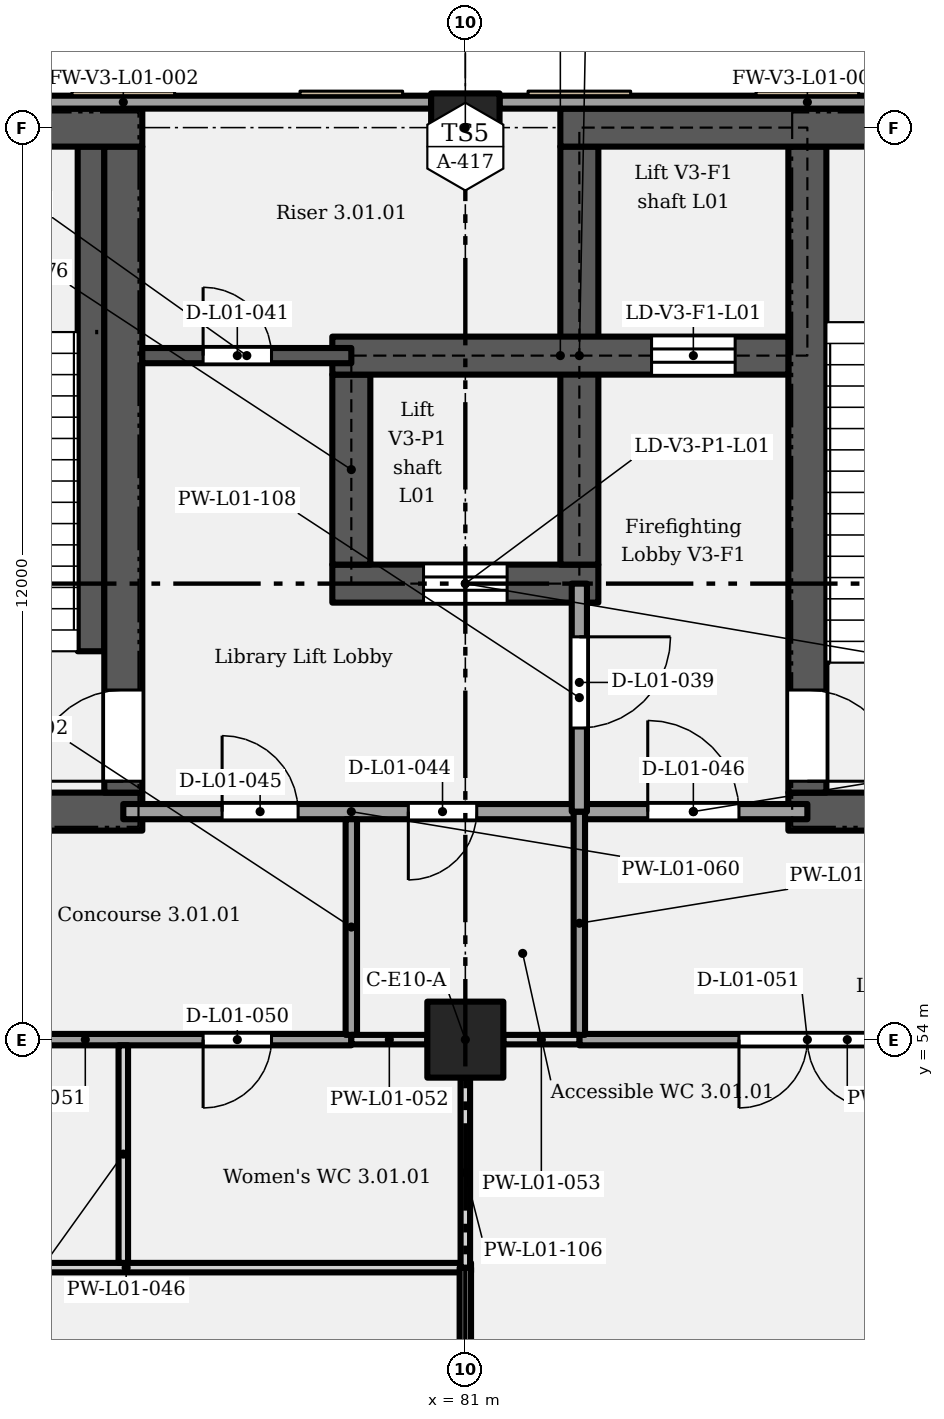
"""IFC4 building model, lengths in metres.
Left out: names, types, materials, properties, quantities, classifications, styles, units other than length and angle.
Written with IfcOpenShell. Run it as: python <this file> out.ifc"""

import sys

from ifc_helpers import new_model, si_unit, direction, frame, frame_2d, origin, origin_2d, place, context, subcontext, project, spatial, rectangle, extrude, element, fill, save


model = new_model("IFC4")
c1 = context("Model", 3, precision=1e-05, world=origin(), true_north=direction((0.0, 1.0)))
c2 = subcontext(c1, "Body", "Model", "MODEL_VIEW")
j1 = project(units=[si_unit("LENGTHUNIT", "METRE"), si_unit("PLANEANGLEUNIT", "RADIAN")], contexts=[c1])
p1 = place(None, origin())
s1 = spatial("IfcSite", under=j1, at=p1, CompositionType="ELEMENT")
p2 = place(p1, origin())
s2 = spatial("IfcBuilding", under=s1, at=p2, CompositionType="ELEMENT")
p3 = place(p2, frame((0.0, 0.0, 6.6)))
s3 = spatial("IfcBuildingStorey", under=s2, at=p3, CompositionType="ELEMENT", Elevation=6.6)
p4 = place(p3, frame((81.0, 54.0, 0.0), z_axis=(0.0, 0.0, 1.0), x_axis=(1.0, 0.0, 0.0)))
e1 = element("IfcColumn", 1, at=p4, inside=s3, PredefinedType="COLUMN", context=c2, shape_type="SweptSolid", body=[
    extrude(rectangle(XDim=1.0, YDim=1.0, at=origin_2d()), origin(), (0.0, 0.0, 1.0), 5.4),
])
p5 = place(p3, frame((81.0, 66.0, 0.0), z_axis=(0.0, 0.0, 1.0), x_axis=(1.0, 0.0, 0.0)))
e2 = element("IfcColumn", 2, at=p5, inside=s3, PredefinedType="COLUMN", context=c2, shape_type="SweptSolid", body=[
    extrude(rectangle(XDim=0.9, YDim=0.9, at=origin_2d()), origin(), (0.0, 0.0, 1.0), 5.4),
])
p6 = place(p3, frame((71.75, 57.0, 0.0), z_axis=(0.0, 0.0, 1.0), x_axis=(1.0, 0.0, 0.0)))
e3 = element("IfcWall", 3, at=p6, inside=s3, PredefinedType="SHEAR", context=c2, shape_type="SweptSolid", body=[
    extrude(rectangle(XDim=5.0, YDim=0.5, at=frame_2d((2.5, 0.0))), origin(), (0.0, 0.0, 1.0), 5.1),
])
p7 = place(p6, frame((1.9, 0.0, 0.0)))
e4 = element("IfcOpeningElement", 4, at=p7, cuts=e3, PredefinedType="OPENING", context=c2, shape_type="SweptSolid", body=[
    extrude(rectangle(XDim=1.2, YDim=2.1, at=frame_2d((0.6, 1.05))), frame((0.0, 0.26, 0.0), z_axis=(0.0, -1.0, 0.0), x_axis=(1.0, 0.0, 0.0)), (0.0, 0.0, 1.0), 0.52),
])
p8 = place(p3, frame((85.25, 57.0, 0.0), z_axis=(0.0, 0.0, 1.0), x_axis=(1.0, 0.0, 0.0)))
e5 = element("IfcWall", 5, at=p8, inside=s3, PredefinedType="SHEAR", context=c2, shape_type="SweptSolid", body=[
    extrude(rectangle(XDim=5.0, YDim=0.5, at=frame_2d((2.5, 0.0))), origin(), (0.0, 0.0, 1.0), 5.1),
])
p9 = place(p8, frame((1.9, 0.0, 0.0)))
e6 = element("IfcOpeningElement", 6, at=p9, cuts=e5, PredefinedType="OPENING", context=c2, shape_type="SweptSolid", body=[
    extrude(rectangle(XDim=1.2, YDim=2.1, at=frame_2d((0.6, 1.05))), frame((0.0, 0.26, 0.0), z_axis=(0.0, -1.0, 0.0), x_axis=(1.0, 0.0, 0.0)), (0.0, 0.0, 1.0), 0.52),
])
p10 = place(p3, frame((76.5, 57.25, 0.0), z_axis=(0.0, 0.0, 1.0), x_axis=(0.0, 1.0, 0.0)))
e7 = element("IfcWall", 7, at=p10, inside=s3, PredefinedType="SHEAR", context=c2, shape_type="SweptSolid", body=[
    extrude(rectangle(XDim=8.5, YDim=0.5, at=frame_2d((4.25, 0.0))), origin(), (0.0, 0.0, 1.0), 5.1),
])
p11 = place(p10, frame((0.15, 0.0, 0.0)))
e8 = element("IfcOpeningElement", 8, at=p11, cuts=e7, PredefinedType="OPENING", context=c2, shape_type="SweptSolid", body=[
    extrude(rectangle(XDim=1.2, YDim=2.1, at=frame_2d((0.6, 1.05))), frame((0.0, 0.26, 0.0), z_axis=(0.0, -1.0, 0.0), x_axis=(1.0, 0.0, 0.0)), (0.0, 0.0, 1.0), 0.52),
])
p12 = place(p3, frame((85.5, 57.25, 0.0), z_axis=(0.0, 0.0, 1.0), x_axis=(0.0, 1.0, 0.0)))
e9 = element("IfcWall", 9, at=p12, inside=s3, PredefinedType="SHEAR", context=c2, shape_type="SweptSolid", body=[
    extrude(rectangle(XDim=8.5, YDim=0.5, at=frame_2d((4.25, 0.0))), origin(), (0.0, 0.0, 1.0), 5.1),
])
p13 = place(p12, frame((1.35, 0.0, 0.0), z_axis=(0.0, 0.0, 1.0), x_axis=(-1.0, 0.0, 0.0)))
e10 = element("IfcOpeningElement", 10, at=p13, cuts=e9, PredefinedType="OPENING", context=c2, shape_type="SweptSolid", body=[
    extrude(rectangle(XDim=1.2, YDim=2.1, at=frame_2d((0.6, 1.05))), frame((0.0, 0.26, 0.0), z_axis=(0.0, -1.0, 0.0), x_axis=(1.0, 0.0, 0.0)), (0.0, 0.0, 1.0), 0.52),
])
p14 = place(p3, frame((79.25, 60.0, 0.0), z_axis=(0.0, 0.0, 1.0), x_axis=(1.0, 0.0, 0.0)))
e11 = element("IfcWall", 11, at=p14, inside=s3, PredefinedType="SHEAR", context=c2, shape_type="SweptSolid", body=[
    extrude(rectangle(XDim=3.5, YDim=0.5, at=frame_2d((1.75, 0.0))), origin(), (0.0, 0.0, 1.0), 5.1),
])
p15 = place(p14, frame((1.2, 0.0, 0.0)))
e12 = element("IfcOpeningElement", 12, at=p15, cuts=e11, PredefinedType="OPENING", context=c2, shape_type="SweptSolid", body=[
    extrude(rectangle(XDim=1.1, YDim=2.1, at=frame_2d((0.55, 1.05))), frame((0.0, 0.26, 0.0), z_axis=(0.0, -1.0, 0.0), x_axis=(1.0, 0.0, 0.0)), (0.0, 0.0, 1.0), 0.52),
])
p16 = place(p3, frame((79.5, 60.25, 0.0), z_axis=(0.0, 0.0, 1.0), x_axis=(0.0, 1.0, 0.0)))
e13 = element("IfcWall", 13, at=p16, inside=s3, PredefinedType="SHEAR", context=c2, shape_type="SweptSolid", body=[
    extrude(rectangle(XDim=2.5, YDim=0.5, at=frame_2d((1.25, 0.0))), origin(), (0.0, 0.0, 1.0), 5.1),
])
p17 = place(p3, frame((82.5, 60.25, 0.0), z_axis=(0.0, 0.0, 1.0), x_axis=(0.0, 1.0, 0.0)))
e14 = element("IfcWall", 14, at=p17, inside=s3, PredefinedType="SHEAR", context=c2, shape_type="SweptSolid", body=[
    extrude(rectangle(XDim=5.5, YDim=0.5, at=frame_2d((2.75, 0.0))), origin(), (0.0, 0.0, 1.0), 5.1),
])
p18 = place(p3, frame((79.25, 63.0, 0.0), z_axis=(0.0, 0.0, 1.0), x_axis=(1.0, 0.0, 0.0)))
e15 = element("IfcWall", 15, at=p18, inside=s3, PredefinedType="SHEAR", context=c2, shape_type="SweptSolid", body=[
    extrude(rectangle(XDim=6.0, YDim=0.5, at=frame_2d((3.0, 0.0))), origin(), (0.0, 0.0, 1.0), 5.1),
])
p19 = place(p18, frame((4.2, 0.0, 0.0)))
e16 = element("IfcOpeningElement", 16, at=p19, cuts=e15, PredefinedType="OPENING", context=c2, shape_type="SweptSolid", body=[
    extrude(rectangle(XDim=1.1, YDim=2.1, at=frame_2d((0.55, 1.05))), frame((0.0, 0.26, 0.0), z_axis=(0.0, -1.0, 0.0), x_axis=(1.0, 0.0, 0.0)), (0.0, 0.0, 1.0), 0.52),
])
p20 = place(p3, frame((72.45, 66.0, 0.0), z_axis=(0.0, 0.0, 1.0), x_axis=(1.0, 0.0, 0.0)))
e17 = element("IfcWall", 17, at=p20, inside=s3, PredefinedType="SHEAR", context=c2, shape_type="SweptSolid", body=[
    extrude(rectangle(XDim=4.3, YDim=0.5, at=frame_2d((2.15, 0.0))), origin(), (0.0, 0.0, 1.0), 5.1),
])
p21 = place(p3, frame((82.25, 66.0, 0.0), z_axis=(0.0, 0.0, 1.0), x_axis=(1.0, 0.0, 0.0)))
e18 = element("IfcWall", 18, at=p21, inside=s3, PredefinedType="SHEAR", context=c2, shape_type="SweptSolid", body=[
    extrude(rectangle(XDim=7.3, YDim=0.5, at=frame_2d((3.65, 0.0))), origin(), (0.0, 0.0, 1.0), 5.1),
])
for number, where, z_axis, x_axis in (
    (19, (72.45, 66.335, 0.0), (0.0, 0.0, 1.0), (1.0, 0.0, 0.0)),
    (20, (81.45, 66.335, 0.0), (0.0, 0.0, 1.0), (1.0, 0.0, 0.0)),
):
    element("IfcWall", number, at=place(p3, frame(where, z_axis=z_axis, x_axis=x_axis)), inside=s3, PredefinedType="SOLIDWALL", context=c2, shape_type="SweptSolid", body=[
        extrude(rectangle(XDim=8.1, YDim=0.17, at=frame_2d((4.05, 0.0))), origin(), (0.0, 0.0, 1.0), 5.1),
    ])
p22 = place(p3, frame((72.0, 51.0, 0.0), z_axis=(0.0, 0.0, 1.0), x_axis=(1.0, 0.0, 0.0)))
e21 = element("IfcWall", 21, at=p22, inside=s3, PredefinedType="PARTITIONING", context=c2, shape_type="SweptSolid", body=[
    extrude(rectangle(XDim=9.075, YDim=0.125, at=frame_2d((4.538, 0.0))), origin(), (0.0, 0.0, 1.0), 5.1),
])
p23 = place(p3, frame((72.5, 54.0, 0.0), z_axis=(0.0, 0.0, 1.0), x_axis=(1.0, 0.0, 0.0)))
e22 = element("IfcWall", 22, at=p23, inside=s3, PredefinedType="PARTITIONING", context=c2, shape_type="SweptSolid", body=[
    extrude(rectangle(XDim=7.0, YDim=0.15, at=frame_2d((3.5, 0.0))), origin(), (0.0, 0.0, 1.0), 4.35),
])
p24 = place(p23, frame((2.2, 0.0, 0.0), z_axis=(0.0, 0.0, 1.0), x_axis=(-1.0, 0.0, 0.0)))
e23 = element("IfcOpeningElement", 23, at=p24, cuts=e22, PredefinedType="OPENING", context=c2, shape_type="SweptSolid", body=[
    extrude(rectangle(XDim=0.9, YDim=2.1, at=frame_2d((0.45, 1.05))), frame((0.0, 0.085, 0.0), z_axis=(0.0, -1.0, 0.0), x_axis=(1.0, 0.0, 0.0)), (0.0, 0.0, 1.0), 0.17),
])
p25 = place(p23, frame((5.95, 0.0, 0.0), z_axis=(0.0, 0.0, 1.0), x_axis=(-1.0, 0.0, 0.0)))
e24 = element("IfcOpeningElement", 24, at=p25, cuts=e22, PredefinedType="OPENING", context=c2, shape_type="SweptSolid", body=[
    extrude(rectangle(XDim=0.9, YDim=2.1, at=frame_2d((0.45, 1.05))), frame((0.0, 0.085, 0.0), z_axis=(0.0, -1.0, 0.0), x_axis=(1.0, 0.0, 0.0)), (0.0, 0.0, 1.0), 0.17),
])
for number, where, z_axis, x_axis in (
    (25, (79.5, 54.0, 0.0), (0.0, 0.0, 1.0), (1.0, 0.0, 0.0)),
    (26, (81.5, 54.0, 0.0), (0.0, 0.0, 1.0), (1.0, 0.0, 0.0)),
):
    element("IfcWall", number, at=place(p3, frame(where, z_axis=z_axis, x_axis=x_axis)), inside=s3, PredefinedType="PARTITIONING", context=c2, shape_type="SweptSolid", body=[
        extrude(rectangle(XDim=1.0, YDim=0.125, at=frame_2d((0.5, 0.0))), origin(), (0.0, 0.0, 1.0), 4.35),
    ])
p26 = place(p3, frame((82.5, 54.0, 0.0), z_axis=(0.0, 0.0, 1.0), x_axis=(1.0, 0.0, 0.0)))
e27 = element("IfcWall", 27, at=p26, inside=s3, PredefinedType="PARTITIONING", context=c2, shape_type="SweptSolid", body=[
    extrude(rectangle(XDim=7.05, YDim=0.15, at=frame_2d((3.525, 0.0))), origin(), (0.0, 0.0, 1.0), 4.35),
])
p27 = place(p26, frame((3.9, 0.0, 0.0), z_axis=(0.0, 0.0, 1.0), x_axis=(-1.0, 0.0, 0.0)))
e28 = element("IfcOpeningElement", 28, at=p27, cuts=e27, PredefinedType="OPENING", context=c2, shape_type="SweptSolid", body=[
    extrude(rectangle(XDim=1.8, YDim=2.4, at=frame_2d((0.9, 1.2))), frame((0.0, 0.085, 0.0), z_axis=(0.0, -1.0, 0.0), x_axis=(1.0, 0.0, 0.0)), (0.0, 0.0, 1.0), 0.17),
])
p28 = place(p3, frame((76.5, 57.0, 0.0), z_axis=(0.0, 0.0, 1.0), x_axis=(1.0, 0.0, 0.0)))
e29 = element("IfcWall", 29, at=p28, inside=s3, PredefinedType="PARTITIONING", context=c2, shape_type="SweptSolid", body=[
    extrude(rectangle(XDim=6.0, YDim=0.2, at=frame_2d((3.0, 0.0))), origin(), (0.0, 0.0, 1.0), 5.1),
])
p29 = place(p28, frame((4.65, 0.0, 0.0), z_axis=(0.0, 0.0, 1.0), x_axis=(-1.0, 0.0, 0.0)))
e30 = element("IfcOpeningElement", 30, at=p29, cuts=e29, PredefinedType="OPENING", context=c2, shape_type="SweptSolid", body=[
    extrude(rectangle(XDim=0.9, YDim=2.1, at=frame_2d((0.45, 1.05))), frame((0.0, 0.11, 0.0), z_axis=(0.0, -1.0, 0.0), x_axis=(1.0, 0.0, 0.0)), (0.0, 0.0, 1.0), 0.22),
])
p30 = place(p28, frame((1.3, 0.0, 0.0)))
e31 = element("IfcOpeningElement", 31, at=p30, cuts=e29, PredefinedType="OPENING", context=c2, shape_type="SweptSolid", body=[
    extrude(rectangle(XDim=1.0, YDim=2.1, at=frame_2d((0.5, 1.05))), frame((0.0, 0.11, 0.0), z_axis=(0.0, -1.0, 0.0), x_axis=(1.0, 0.0, 0.0)), (0.0, 0.0, 1.0), 0.22),
])
p31 = place(p3, frame((82.5, 57.0, 0.0), z_axis=(0.0, 0.0, 1.0), x_axis=(1.0, 0.0, 0.0)))
e32 = element("IfcWall", 32, at=p31, inside=s3, PredefinedType="PARTITIONING", context=c2, shape_type="SweptSolid", body=[
    extrude(rectangle(XDim=3.0, YDim=0.2, at=frame_2d((1.5, 0.0))), origin(), (0.0, 0.0, 1.0), 5.1),
])
p32 = place(p31, frame((0.9, 0.0, 0.0)))
e33 = element("IfcOpeningElement", 33, at=p32, cuts=e32, PredefinedType="OPENING", context=c2, shape_type="SweptSolid", body=[
    extrude(rectangle(XDim=1.2, YDim=2.1, at=frame_2d((0.6, 1.05))), frame((0.0, 0.11, 0.0), z_axis=(0.0, -1.0, 0.0), x_axis=(1.0, 0.0, 0.0)), (0.0, 0.0, 1.0), 0.22),
])
p33 = place(p3, frame((76.75, 63.0, 0.0), z_axis=(0.0, 0.0, 1.0), x_axis=(1.0, 0.0, 0.0)))
e34 = element("IfcWall", 34, at=p33, inside=s3, PredefinedType="SHEAR", context=c2, shape_type="SweptSolid", body=[
    extrude(rectangle(XDim=2.75, YDim=0.2, at=frame_2d((1.375, 0.0))), origin(), (0.0, 0.0, 1.0), 5.1),
])
p34 = place(p33, frame((0.8, 0.0, 0.0)))
e35 = element("IfcOpeningElement", 35, at=p34, cuts=e34, PredefinedType="OPENING", context=c2, shape_type="SweptSolid", body=[
    extrude(rectangle(XDim=0.9, YDim=2.0, at=frame_2d((0.45, 1.0))), frame((0.0, 0.11, 0.0), z_axis=(0.0, -1.0, 0.0), x_axis=(1.0, 0.0, 0.0)), (0.0, 0.0, 1.0), 0.22),
])
p35 = place(p3, frame((76.5, 51.062, 0.0), z_axis=(0.0, 0.0, 1.0), x_axis=(0.0, 1.0, 0.0)))
e36 = element("IfcWall", 36, at=p35, inside=s3, PredefinedType="PARTITIONING", context=c2, shape_type="SweptSolid", body=[
    extrude(rectangle(XDim=2.863, YDim=0.125, at=frame_2d((1.431, 0.0))), origin(), (0.0, 0.0, 1.0), 5.1),
])
p36 = place(p3, frame((79.5, 54.062, 0.0), z_axis=(0.0, 0.0, 1.0), x_axis=(0.0, 1.0, 0.0)))
e37 = element("IfcWall", 37, at=p36, inside=s3, PredefinedType="PARTITIONING", context=c2, shape_type="SweptSolid", body=[
    extrude(rectangle(XDim=2.837, YDim=0.15, at=frame_2d((1.419, 0.0))), origin(), (0.0, 0.0, 1.0), 5.1),
])
p37 = place(p3, frame((81.0, 38.0, 0.0), z_axis=(0.0, 0.0, 1.0), x_axis=(0.0, 1.0, 0.0)))
e38 = element("IfcWall", 38, at=p37, inside=s3, PredefinedType="PARTITIONING", context=c2, shape_type="SweptSolid", body=[
    extrude(rectangle(XDim=13.0, YDim=0.15, at=frame_2d((6.5, 0.0))), origin(), (0.0, 0.0, 1.0), 4.15),
])
p38 = place(p37, frame((7.6, 0.0, 0.0), z_axis=(0.0, 0.0, 1.0), x_axis=(-1.0, 0.0, 0.0)))
e39 = element("IfcOpeningElement", 39, at=p38, cuts=e38, PredefinedType="OPENING", context=c2, shape_type="SweptSolid", body=[
    extrude(rectangle(XDim=1.2, YDim=2.4, at=frame_2d((0.6, 1.2))), frame((0.0, 0.085, 0.0), z_axis=(0.0, -1.0, 0.0), x_axis=(1.0, 0.0, 0.0)), (0.0, 0.0, 1.0), 0.17),
])
p39 = place(p3, frame((81.0, 51.0, 0.0), z_axis=(0.0, 0.0, 1.0), x_axis=(0.0, 1.0, 0.0)))
e40 = element("IfcWall", 40, at=p39, inside=s3, PredefinedType="PARTITIONING", context=c2, shape_type="SweptSolid", body=[
    extrude(rectangle(XDim=2.5, YDim=0.125, at=frame_2d((1.25, 0.0))), origin(), (0.0, 0.0, 1.0), 4.15),
])
p40 = place(p3, frame((82.5, 54.062, 0.0), z_axis=(0.0, 0.0, 1.0), x_axis=(0.0, 1.0, 0.0)))
e41 = element("IfcWall", 41, at=p40, inside=s3, PredefinedType="PARTITIONING", context=c2, shape_type="SweptSolid", body=[
    extrude(rectangle(XDim=2.938, YDim=0.15, at=frame_2d((1.469, 0.0))), origin(), (0.0, 0.0, 1.0), 5.1),
])
p41 = place(p3, frame((82.5, 57.0, 0.0), z_axis=(0.0, 0.0, 1.0), x_axis=(0.0, 1.0, 0.0)))
e42 = element("IfcWall", 42, at=p41, inside=s3, PredefinedType="PARTITIONING", context=c2, shape_type="SweptSolid", body=[
    extrude(rectangle(XDim=3.0, YDim=0.2, at=frame_2d((1.5, 0.0))), origin(), (0.0, 0.0, 1.0), 5.1),
])
p42 = place(p41, frame((2.3, 0.0, 0.0), z_axis=(0.0, 0.0, 1.0), x_axis=(-1.0, 0.0, 0.0)))
e43 = element("IfcOpeningElement", 43, at=p42, cuts=e42, PredefinedType="OPENING", context=c2, shape_type="SweptSolid", body=[
    extrude(rectangle(XDim=1.2, YDim=2.1, at=frame_2d((0.6, 1.05))), frame((0.0, 0.11, 0.0), z_axis=(0.0, -1.0, 0.0), x_axis=(1.0, 0.0, 0.0)), (0.0, 0.0, 1.0), 0.22),
])
p43 = place(p3, frame((76.075, 59.11, 0.0), z_axis=(0.0, 0.0, 1.0), x_axis=(0.0, 1.0, 0.0)))
e44 = element("IfcWall", 44, at=p43, inside=s3, PredefinedType="SHEAR", context=c2, shape_type="SweptSolid", body=[
    extrude(rectangle(XDim=6.64, YDim=0.35, at=frame_2d((3.32, 0.0))), origin(), (0.0, 0.0, 1.0), 2.587),
])
p44 = place(p11, origin())
e45 = element("IfcDoor", 45, at=p44, inside=s3, OperationType="SINGLE_SWING_LEFT", PredefinedType="DOOR", context=c2, shape_type="SweptSolid", body=[
    extrude(rectangle(XDim=1.2, YDim=2.1, at=frame_2d((0.6, 1.05))), frame((0.0, 0.025, 0.0), z_axis=(0.0, -1.0, 0.0), x_axis=(1.0, 0.0, 0.0)), (0.0, 0.0, 1.0), 0.05),
])
fill(e8, e45)
p45 = place(p42, origin())
e46 = element("IfcDoor", 46, at=p45, inside=s3, OperationType="SINGLE_SWING_LEFT", PredefinedType="DOOR", context=c2, shape_type="SweptSolid", body=[
    extrude(rectangle(XDim=1.2, YDim=2.1, at=frame_2d((0.6, 1.05))), frame((0.0, 0.025, 0.0), z_axis=(0.0, -1.0, 0.0), x_axis=(1.0, 0.0, 0.0)), (0.0, 0.0, 1.0), 0.05),
])
fill(e43, e46)
p46 = place(p15, origin())
e47 = element("IfcDoor", 47, at=p46, inside=s3, OperationType="SLIDING_TO_LEFT", PredefinedType="DOOR", context=c2, shape_type="SweptSolid", body=[
    extrude(rectangle(XDim=1.1, YDim=2.1, at=frame_2d((0.55, 1.05))), frame((0.0, 0.025, 0.0), z_axis=(0.0, -1.0, 0.0), x_axis=(1.0, 0.0, 0.0)), (0.0, 0.0, 1.0), 0.05),
])
fill(e12, e47)
p47 = place(p34, origin())
e48 = element("IfcDoor", 48, at=p47, inside=s3, OperationType="SINGLE_SWING_LEFT", PredefinedType="DOOR", context=c2, shape_type="SweptSolid", body=[
    extrude(rectangle(XDim=0.9, YDim=2.0, at=frame_2d((0.45, 1.0))), frame((0.0, 0.025, 0.0), z_axis=(0.0, -1.0, 0.0), x_axis=(1.0, 0.0, 0.0)), (0.0, 0.0, 1.0), 0.05),
])
fill(e35, e48)
p48 = place(p19, origin())
e49 = element("IfcDoor", 49, at=p48, inside=s3, OperationType="SLIDING_TO_LEFT", PredefinedType="DOOR", context=c2, shape_type="SweptSolid", body=[
    extrude(rectangle(XDim=1.1, YDim=2.1, at=frame_2d((0.55, 1.05))), frame((0.0, 0.025, 0.0), z_axis=(0.0, -1.0, 0.0), x_axis=(1.0, 0.0, 0.0)), (0.0, 0.0, 1.0), 0.05),
])
fill(e16, e49)
p49 = place(p13, origin())
e50 = element("IfcDoor", 50, at=p49, inside=s3, OperationType="SINGLE_SWING_RIGHT", PredefinedType="DOOR", context=c2, shape_type="SweptSolid", body=[
    extrude(rectangle(XDim=1.2, YDim=2.1, at=frame_2d((0.6, 1.05))), frame((0.0, 0.025, 0.0), z_axis=(0.0, -1.0, 0.0), x_axis=(1.0, 0.0, 0.0)), (0.0, 0.0, 1.0), 0.05),
])
fill(e10, e50)
p50 = place(p29, origin())
e51 = element("IfcDoor", 51, at=p50, inside=s3, OperationType="SINGLE_SWING_RIGHT", PredefinedType="DOOR", context=c2, shape_type="SweptSolid", body=[
    extrude(rectangle(XDim=0.9, YDim=2.1, at=frame_2d((0.45, 1.05))), frame((0.0, 0.025, 0.0), z_axis=(0.0, -1.0, 0.0), x_axis=(1.0, 0.0, 0.0)), (0.0, 0.0, 1.0), 0.05),
])
fill(e30, e51)
p51 = place(p30, origin())
e52 = element("IfcDoor", 52, at=p51, inside=s3, OperationType="SINGLE_SWING_LEFT", PredefinedType="DOOR", context=c2, shape_type="SweptSolid", body=[
    extrude(rectangle(XDim=1.0, YDim=2.1, at=frame_2d((0.5, 1.05))), frame((0.0, 0.025, 0.0), z_axis=(0.0, -1.0, 0.0), x_axis=(1.0, 0.0, 0.0)), (0.0, 0.0, 1.0), 0.05),
])
fill(e31, e52)
p52 = place(p32, origin())
e53 = element("IfcDoor", 53, at=p52, inside=s3, OperationType="SINGLE_SWING_LEFT", PredefinedType="DOOR", context=c2, shape_type="SweptSolid", body=[
    extrude(rectangle(XDim=1.2, YDim=2.1, at=frame_2d((0.6, 1.05))), frame((0.0, 0.025, 0.0), z_axis=(0.0, -1.0, 0.0), x_axis=(1.0, 0.0, 0.0)), (0.0, 0.0, 1.0), 0.05),
])
fill(e33, e53)
p53 = place(p25, origin())
e54 = element("IfcDoor", 54, at=p53, inside=s3, OperationType="SINGLE_SWING_RIGHT", PredefinedType="DOOR", context=c2, shape_type="SweptSolid", body=[
    extrude(rectangle(XDim=0.9, YDim=2.1, at=frame_2d((0.45, 1.05))), frame((0.0, 0.025, 0.0), z_axis=(0.0, -1.0, 0.0), x_axis=(1.0, 0.0, 0.0)), (0.0, 0.0, 1.0), 0.05),
])
fill(e24, e54)
p54 = place(p27, origin())
e55 = element("IfcDoor", 55, at=p54, inside=s3, OperationType="DOUBLE_DOOR_SINGLE_SWING", PredefinedType="DOOR", context=c2, shape_type="SweptSolid", body=[
    extrude(rectangle(XDim=1.8, YDim=2.4, at=frame_2d((0.9, 1.2))), frame((0.0, 0.025, 0.0), z_axis=(0.0, -1.0, 0.0), x_axis=(1.0, 0.0, 0.0)), (0.0, 0.0, 1.0), 0.05),
])
fill(e28, e55)
save(model, sys.argv[1])
